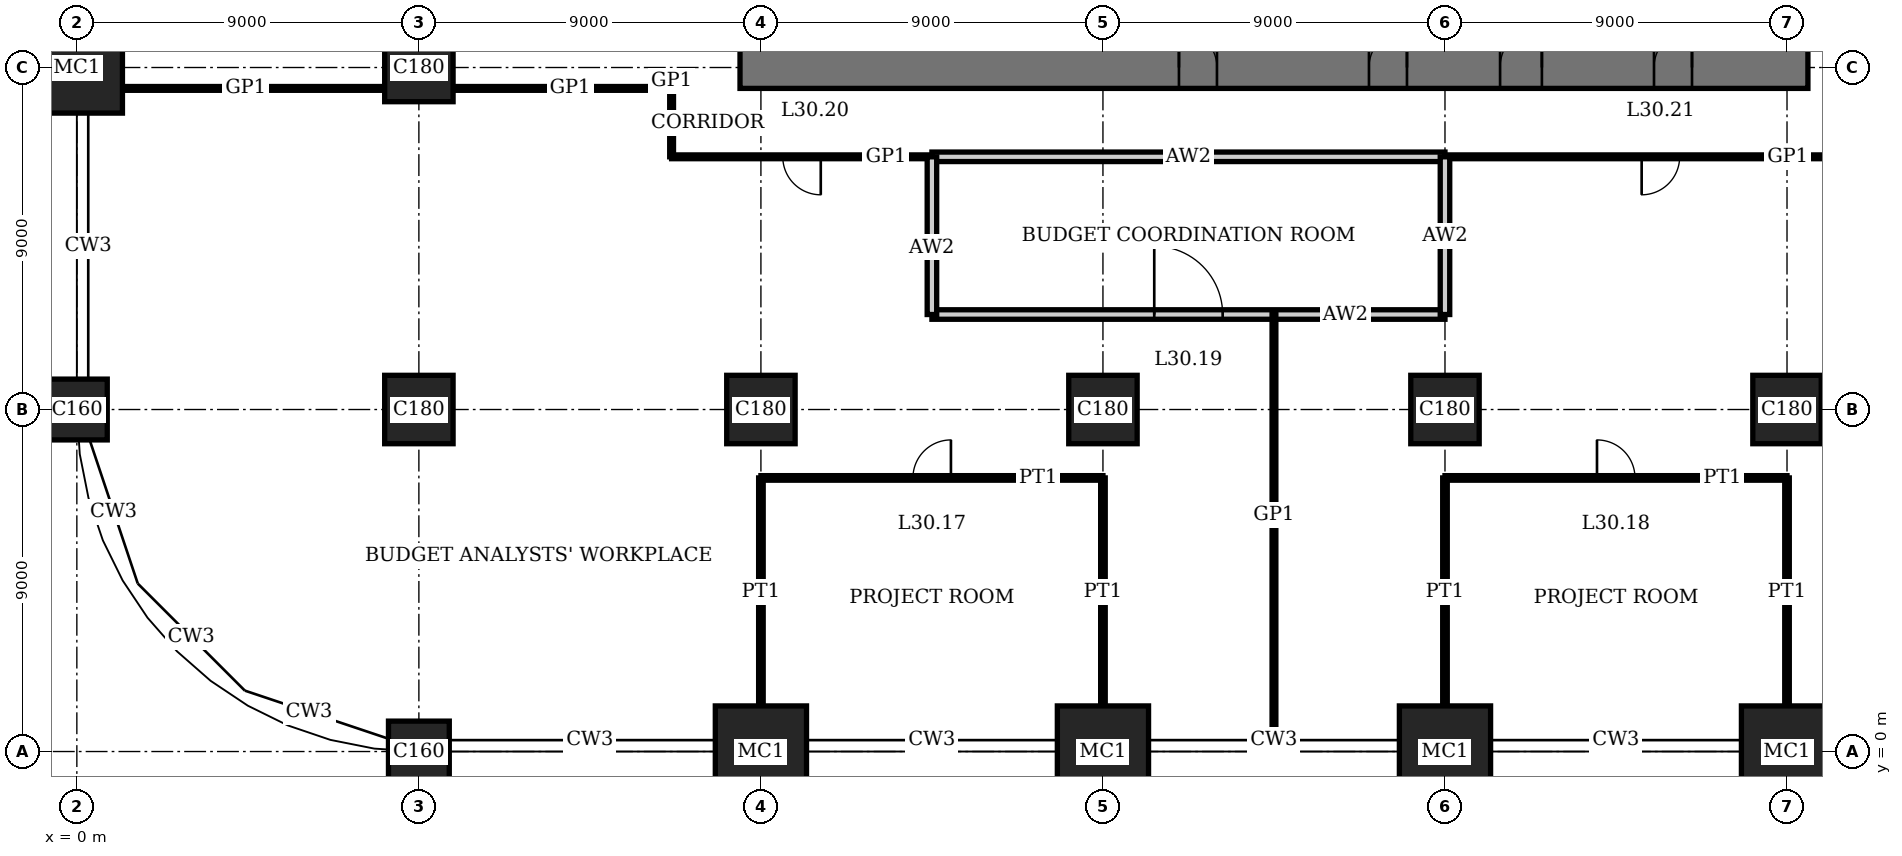
"""IFC4 building model, lengths in metres.
Left out: names, types, materials, properties, quantities, classifications, styles, units other than length and angle.
Written with IfcOpenShell. Run it as: python <this file> out.ifc"""

import sys

from ifc_helpers import new_model, si_unit, direction, frame, frame_2d, origin, origin_2d, place, context, subcontext, project, spatial, rectangle, extrude, element, fill, save


model = new_model("IFC4")
c1 = context("Model", 3, precision=1e-05, world=origin(), true_north=direction((0.0, 1.0)))
c2 = subcontext(c1, "Body", "Model", "MODEL_VIEW")
j1 = project(units=[si_unit("LENGTHUNIT", "METRE"), si_unit("PLANEANGLEUNIT", "RADIAN")], contexts=[c1])
p1 = place(None, origin())
s1 = spatial("IfcSite", under=j1, at=p1, CompositionType="ELEMENT")
p2 = place(p1, origin())
s2 = spatial("IfcBuilding", under=s1, at=p2, CompositionType="ELEMENT")
p3 = place(p2, frame((0.0, 0.0, 125.0)))
s3 = spatial("IfcBuildingStorey", under=s2, at=p3, CompositionType="ELEMENT", Elevation=125.0)
p4 = place(p3, frame((0.0, 9.0, 0.0), z_axis=(0.0, 0.0, 1.0), x_axis=(1.0, 0.0, 0.0)))
e1 = element("IfcColumn", 1, at=p4, inside=s3, PredefinedType="COLUMN", context=c2, shape_type="SweptSolid", body=[
    extrude(rectangle(XDim=1.6, YDim=1.6, at=origin_2d()), origin(), (0.0, 0.0, 1.0), 4.0),
])
p5 = place(p3, frame((0.0, 18.0, 0.0), z_axis=(0.0, 0.0, 1.0), x_axis=(1.0, 0.0, 0.0)))
e2 = element("IfcColumn", 2, at=p5, inside=s3, PredefinedType="COLUMN", context=c2, shape_type="SweptSolid", body=[
    extrude(rectangle(XDim=2.4, YDim=2.4, at=origin_2d()), origin(), (0.0, 0.0, 1.0), 4.0),
])
p6 = place(p3, frame((9.0, 0.0, 0.0), z_axis=(0.0, 0.0, 1.0), x_axis=(1.0, 0.0, 0.0)))
e3 = element("IfcColumn", 3, at=p6, inside=s3, PredefinedType="COLUMN", context=c2, shape_type="SweptSolid", body=[
    extrude(rectangle(XDim=1.6, YDim=1.6, at=origin_2d()), origin(), (0.0, 0.0, 1.0), 4.0),
])
for number, where, z_axis, x_axis in (
    (4, (9.0, 9.0, 0.0), (0.0, 0.0, 1.0), (1.0, 0.0, 0.0)),
    (5, (9.0, 18.0, 0.0), (0.0, 0.0, 1.0), (1.0, 0.0, 0.0)),
):
    element("IfcColumn", number, at=place(p3, frame(where, z_axis=z_axis, x_axis=x_axis)), inside=s3, PredefinedType="COLUMN", context=c2, shape_type="SweptSolid", body=[
        extrude(rectangle(XDim=1.8, YDim=1.8, at=origin_2d()), origin(), (0.0, 0.0, 1.0), 4.0),
    ])
p7 = place(p3, frame((18.0, 0.0, 0.0), z_axis=(0.0, 0.0, 1.0), x_axis=(1.0, 0.0, 0.0)))
e6 = element("IfcColumn", 6, at=p7, inside=s3, PredefinedType="COLUMN", context=c2, shape_type="SweptSolid", body=[
    extrude(rectangle(XDim=2.4, YDim=2.4, at=origin_2d()), origin(), (0.0, 0.0, 1.0), 4.0),
])
p8 = place(p3, frame((18.0, 9.0, 0.0), z_axis=(0.0, 0.0, 1.0), x_axis=(1.0, 0.0, 0.0)))
e7 = element("IfcColumn", 7, at=p8, inside=s3, PredefinedType="COLUMN", context=c2, shape_type="SweptSolid", body=[
    extrude(rectangle(XDim=1.8, YDim=1.8, at=origin_2d()), origin(), (0.0, 0.0, 1.0), 4.0),
])
p9 = place(p3, frame((27.0, 0.0, 0.0), z_axis=(0.0, 0.0, 1.0), x_axis=(1.0, 0.0, 0.0)))
e8 = element("IfcColumn", 8, at=p9, inside=s3, PredefinedType="COLUMN", context=c2, shape_type="SweptSolid", body=[
    extrude(rectangle(XDim=2.4, YDim=2.4, at=origin_2d()), origin(), (0.0, 0.0, 1.0), 4.0),
])
p10 = place(p3, frame((27.0, 9.0, 0.0), z_axis=(0.0, 0.0, 1.0), x_axis=(1.0, 0.0, 0.0)))
e9 = element("IfcColumn", 9, at=p10, inside=s3, PredefinedType="COLUMN", context=c2, shape_type="SweptSolid", body=[
    extrude(rectangle(XDim=1.8, YDim=1.8, at=origin_2d()), origin(), (0.0, 0.0, 1.0), 4.0),
])
p11 = place(p3, frame((36.0, 0.0, 0.0), z_axis=(0.0, 0.0, 1.0), x_axis=(1.0, 0.0, 0.0)))
e10 = element("IfcColumn", 10, at=p11, inside=s3, PredefinedType="COLUMN", context=c2, shape_type="SweptSolid", body=[
    extrude(rectangle(XDim=2.4, YDim=2.4, at=origin_2d()), origin(), (0.0, 0.0, 1.0), 4.0),
])
p12 = place(p3, frame((36.0, 9.0, 0.0), z_axis=(0.0, 0.0, 1.0), x_axis=(1.0, 0.0, 0.0)))
e11 = element("IfcColumn", 11, at=p12, inside=s3, PredefinedType="COLUMN", context=c2, shape_type="SweptSolid", body=[
    extrude(rectangle(XDim=1.8, YDim=1.8, at=origin_2d()), origin(), (0.0, 0.0, 1.0), 4.0),
])
p13 = place(p3, frame((45.0, 0.0, 0.0), z_axis=(0.0, 0.0, 1.0), x_axis=(1.0, 0.0, 0.0)))
e12 = element("IfcColumn", 12, at=p13, inside=s3, PredefinedType="COLUMN", context=c2, shape_type="SweptSolid", body=[
    extrude(rectangle(XDim=2.4, YDim=2.4, at=origin_2d()), origin(), (0.0, 0.0, 1.0), 4.0),
])
p14 = place(p3, frame((45.0, 9.0, 0.0), z_axis=(0.0, 0.0, 1.0), x_axis=(1.0, 0.0, 0.0)))
e13 = element("IfcColumn", 13, at=p14, inside=s3, PredefinedType="COLUMN", context=c2, shape_type="SweptSolid", body=[
    extrude(rectangle(XDim=1.8, YDim=1.8, at=origin_2d()), origin(), (0.0, 0.0, 1.0), 4.0),
])
p15 = place(p3, frame((17.45, 18.0, 0.0), z_axis=(0.0, 0.0, 1.0), x_axis=(1.0, 0.0, 0.0)))
e14 = element("IfcWall", 14, at=p15, inside=s3, PredefinedType="SHEAR", context=c2, shape_type="SweptSolid", body=[
    extrude(rectangle(XDim=28.1, YDim=1.1, at=frame_2d((14.05, 0.0))), origin(), (0.0, 0.0, 1.0), 4.0),
])
p16 = place(p15, frame((11.55, 0.0, 0.0)))
e15 = element("IfcOpeningElement", 15, at=p16, cuts=e14, PredefinedType="OPENING", context=c2, shape_type="SweptSolid", body=[
    extrude(rectangle(XDim=1.0, YDim=2.4, at=frame_2d((0.5, 1.2))), frame((0.0, 0.56, 0.0), z_axis=(0.0, -1.0, 0.0), x_axis=(1.0, 0.0, 0.0)), (0.0, 0.0, 1.0), 1.12),
])
p17 = place(p15, frame((16.55, 0.0, 0.0)))
e16 = element("IfcOpeningElement", 16, at=p17, cuts=e14, PredefinedType="OPENING", context=c2, shape_type="SweptSolid", body=[
    extrude(rectangle(XDim=1.0, YDim=2.4, at=frame_2d((0.5, 1.2))), frame((0.0, 0.56, 0.0), z_axis=(0.0, -1.0, 0.0), x_axis=(1.0, 0.0, 0.0)), (0.0, 0.0, 1.0), 1.12),
])
p18 = place(p15, frame((20.0, 0.0, 0.0)))
e17 = element("IfcOpeningElement", 17, at=p18, cuts=e14, PredefinedType="OPENING", context=c2, shape_type="SweptSolid", body=[
    extrude(rectangle(XDim=1.1, YDim=2.4, at=frame_2d((0.55, 1.2))), frame((0.0, 0.56, 0.0), z_axis=(0.0, -1.0, 0.0), x_axis=(1.0, 0.0, 0.0)), (0.0, 0.0, 1.0), 1.12),
])
p19 = place(p15, frame((24.05, 0.0, 0.0)))
e18 = element("IfcOpeningElement", 18, at=p19, cuts=e14, PredefinedType="OPENING", context=c2, shape_type="SweptSolid", body=[
    extrude(rectangle(XDim=1.0, YDim=2.4, at=frame_2d((0.5, 1.2))), frame((0.0, 0.56, 0.0), z_axis=(0.0, -1.0, 0.0), x_axis=(1.0, 0.0, 0.0)), (0.0, 0.0, 1.0), 1.12),
])
p20 = place(p3, frame((18.0, 7.2, 0.0), z_axis=(0.0, 0.0, 1.0), x_axis=(1.0, 0.0, 0.0)))
e19 = element("IfcWall", 19, at=p20, inside=s3, PredefinedType="PARTITIONING", context=c2, shape_type="SweptSolid", body=[
    extrude(rectangle(XDim=9.0, YDim=0.12, at=frame_2d((4.5, 0.0))), origin(), (0.0, 0.0, 1.0), 3.75),
])
p21 = place(p20, frame((4.0, 0.0, 0.0)))
e20 = element("IfcOpeningElement", 20, at=p21, cuts=e19, PredefinedType="OPENING", context=c2, shape_type="SweptSolid", body=[
    extrude(rectangle(XDim=1.0, YDim=2.4, at=frame_2d((0.5, 1.2))), frame((0.0, 0.07, 0.0), z_axis=(0.0, -1.0, 0.0), x_axis=(1.0, 0.0, 0.0)), (0.0, 0.0, 1.0), 0.14),
])
p22 = place(p3, frame((36.0, 7.2, 0.0), z_axis=(0.0, 0.0, 1.0), x_axis=(1.0, 0.0, 0.0)))
e21 = element("IfcWall", 21, at=p22, inside=s3, PredefinedType="PARTITIONING", context=c2, shape_type="SweptSolid", body=[
    extrude(rectangle(XDim=9.0, YDim=0.12, at=frame_2d((4.5, 0.0))), origin(), (0.0, 0.0, 1.0), 3.75),
])
p23 = place(p22, frame((4.0, 0.0, 0.0)))
e22 = element("IfcOpeningElement", 22, at=p23, cuts=e21, PredefinedType="OPENING", context=c2, shape_type="SweptSolid", body=[
    extrude(rectangle(XDim=1.0, YDim=2.4, at=frame_2d((0.5, 1.2))), frame((0.0, 0.07, 0.0), z_axis=(0.0, -1.0, 0.0), x_axis=(1.0, 0.0, 0.0)), (0.0, 0.0, 1.0), 0.14),
])
p24 = place(p3, frame((22.5, 11.5, 0.0), z_axis=(0.0, 0.0, 1.0), x_axis=(1.0, 0.0, 0.0)))
e23 = element("IfcWall", 23, at=p24, inside=s3, PredefinedType="PARTITIONING", context=c2, shape_type="SweptSolid", body=[
    extrude(rectangle(XDim=13.5, YDim=0.25, at=frame_2d((6.75, 0.0))), origin(), (0.0, 0.0, 1.0), 3.75),
])
p25 = place(p24, frame((5.85, 0.0, 0.0)))
e24 = element("IfcOpeningElement", 24, at=p25, cuts=e23, PredefinedType="OPENING", context=c2, shape_type="SweptSolid", body=[
    extrude(rectangle(XDim=1.8, YDim=2.4, at=frame_2d((0.9, 1.2))), frame((0.0, 0.135, 0.0), z_axis=(0.0, -1.0, 0.0), x_axis=(1.0, 0.0, 0.0)), (0.0, 0.0, 1.0), 0.27),
])
p26 = place(p3, frame((22.5, 15.65, 0.0), z_axis=(0.0, 0.0, 1.0), x_axis=(1.0, 0.0, 0.0)))
e25 = element("IfcWall", 25, at=p26, inside=s3, PredefinedType="PARTITIONING", context=c2, shape_type="SweptSolid", body=[
    extrude(rectangle(XDim=13.5, YDim=0.25, at=frame_2d((6.75, 0.0))), origin(), (0.0, 0.0, 1.0), 3.75),
])
p27 = place(p3, frame((15.65, 15.65, 0.0), z_axis=(0.0, 0.0, 1.0), x_axis=(1.0, 0.0, 0.0)))
e26 = element("IfcWall", 26, at=p27, inside=s3, PredefinedType="PARTITIONING", context=c2, shape_type="SweptSolid", body=[
    extrude(rectangle(XDim=6.85, YDim=0.1, at=frame_2d((3.425, 0.0))), origin(), (0.0, 0.0, 1.0), 3.75),
])
p28 = place(p27, frame((2.925, 0.0, 0.0)))
e27 = element("IfcOpeningElement", 27, at=p28, cuts=e26, PredefinedType="OPENING", context=c2, shape_type="SweptSolid", body=[
    extrude(rectangle(XDim=1.0, YDim=2.4, at=frame_2d((0.5, 1.2))), frame((0.0, 0.06, 0.0), z_axis=(0.0, -1.0, 0.0), x_axis=(1.0, 0.0, 0.0)), (0.0, 0.0, 1.0), 0.12),
])
p29 = place(p3, frame((36.0, 15.65, 0.0), z_axis=(0.0, 0.0, 1.0), x_axis=(1.0, 0.0, 0.0)))
e28 = element("IfcWall", 28, at=p29, inside=s3, PredefinedType="PARTITIONING", context=c2, shape_type="SweptSolid", body=[
    extrude(rectangle(XDim=11.35, YDim=0.1, at=frame_2d((5.675, 0.0))), origin(), (0.0, 0.0, 1.0), 3.75),
])
p30 = place(p29, frame((5.175, 0.0, 0.0)))
e29 = element("IfcOpeningElement", 29, at=p30, cuts=e28, PredefinedType="OPENING", context=c2, shape_type="SweptSolid", body=[
    extrude(rectangle(XDim=1.0, YDim=2.4, at=frame_2d((0.5, 1.2))), frame((0.0, 0.06, 0.0), z_axis=(0.0, -1.0, 0.0), x_axis=(1.0, 0.0, 0.0)), (0.0, 0.0, 1.0), 0.12),
])
p31 = place(p3, frame((1.2, 17.45, 0.0), z_axis=(0.0, 0.0, 1.0), x_axis=(1.0, 0.0, 0.0)))
e30 = element("IfcWall", 30, at=p31, inside=s3, PredefinedType="PARTITIONING", context=c2, shape_type="SweptSolid", body=[
    extrude(rectangle(XDim=6.9, YDim=0.1, at=frame_2d((3.45, 0.0))), origin(), (0.0, 0.0, 1.0), 3.75),
])
p32 = place(p3, frame((9.9, 17.45, 0.0), z_axis=(0.0, 0.0, 1.0), x_axis=(1.0, 0.0, 0.0)))
e31 = element("IfcWall", 31, at=p32, inside=s3, PredefinedType="PARTITIONING", context=c2, shape_type="SweptSolid", body=[
    extrude(rectangle(XDim=5.75, YDim=0.1, at=frame_2d((2.875, 0.0))), origin(), (0.0, 0.0, 1.0), 3.75),
])
p33 = place(p3, frame((15.65, 15.65, 0.0), z_axis=(0.0, 0.0, 1.0), x_axis=(0.0, 1.0, 0.0)))
e32 = element("IfcWall", 32, at=p33, inside=s3, PredefinedType="PARTITIONING", context=c2, shape_type="SweptSolid", body=[
    extrude(rectangle(XDim=1.8, YDim=0.1, at=frame_2d((0.9, 0.0))), origin(), (0.0, 0.0, 1.0), 3.75),
])
p34 = place(p3, frame((18.0, 1.2, 0.0), z_axis=(0.0, 0.0, 1.0), x_axis=(0.0, 1.0, 0.0)))
e33 = element("IfcWall", 33, at=p34, inside=s3, PredefinedType="PARTITIONING", context=c2, shape_type="SweptSolid", body=[
    extrude(rectangle(XDim=6.0, YDim=0.12, at=frame_2d((3.0, 0.0))), origin(), (0.0, 0.0, 1.0), 3.05),
])
p35 = place(p3, frame((22.5, 11.5, 0.0), z_axis=(0.0, 0.0, 1.0), x_axis=(0.0, 1.0, 0.0)))
e34 = element("IfcWall", 34, at=p35, inside=s3, PredefinedType="PARTITIONING", context=c2, shape_type="SweptSolid", body=[
    extrude(rectangle(XDim=4.15, YDim=0.25, at=frame_2d((2.075, 0.0))), origin(), (0.0, 0.0, 1.0), 3.75),
])
p36 = place(p3, frame((27.0, 1.2, 0.0), z_axis=(0.0, 0.0, 1.0), x_axis=(0.0, 1.0, 0.0)))
e35 = element("IfcWall", 35, at=p36, inside=s3, PredefinedType="PARTITIONING", context=c2, shape_type="SweptSolid", body=[
    extrude(rectangle(XDim=6.0, YDim=0.12, at=frame_2d((3.0, 0.0))), origin(), (0.0, 0.0, 1.0), 3.05),
])
p37 = place(p3, frame((31.5, 0.31, 0.0), z_axis=(0.0, 0.0, 1.0), x_axis=(0.0, 1.0, 0.0)))
e36 = element("IfcWall", 36, at=p37, inside=s3, PredefinedType="PARTITIONING", context=c2, shape_type="SweptSolid", body=[
    extrude(rectangle(XDim=11.2, YDim=0.1, at=frame_2d((5.6, 0.0))), origin(), (0.0, 0.0, 1.0), 3.75),
])
p38 = place(p3, frame((36.0, 11.5, 0.0), z_axis=(0.0, 0.0, 1.0), x_axis=(0.0, 1.0, 0.0)))
e37 = element("IfcWall", 37, at=p38, inside=s3, PredefinedType="PARTITIONING", context=c2, shape_type="SweptSolid", body=[
    extrude(rectangle(XDim=4.15, YDim=0.25, at=frame_2d((2.075, 0.0))), origin(), (0.0, 0.0, 1.0), 3.05),
])
for number, where, z_axis, x_axis in (
    (38, (36.0, 1.2, 0.0), (0.0, 0.0, 1.0), (0.0, 1.0, 0.0)),
    (39, (45.0, 1.2, 0.0), (0.0, 0.0, 1.0), (0.0, 1.0, 0.0)),
):
    element("IfcWall", number, at=place(p3, frame(where, z_axis=z_axis, x_axis=x_axis)), inside=s3, PredefinedType="PARTITIONING", context=c2, shape_type="SweptSolid", body=[
        extrude(rectangle(XDim=6.0, YDim=0.12, at=frame_2d((3.0, 0.0))), origin(), (0.0, 0.0, 1.0), 3.05),
    ])
p39 = place(p16, origin())
e40 = element("IfcDoor", 40, at=p39, inside=s3, OperationType="SINGLE_SWING_RIGHT", PredefinedType="DOOR", context=c2, shape_type="SweptSolid", body=[
    extrude(rectangle(XDim=1.0, YDim=2.4, at=frame_2d((0.5, 1.2))), frame((0.0, 0.025, 0.0), z_axis=(0.0, -1.0, 0.0), x_axis=(1.0, 0.0, 0.0)), (0.0, 0.0, 1.0), 0.05),
    extrude(rectangle(XDim=0.04, YDim=2.4, at=frame_2d((0.02, 1.2))), frame((0.0, 0.4, 0.0), z_axis=(0.0, -1.0, 0.0), x_axis=(1.0, 0.0, 0.0)), (0.0, 0.0, 1.0), 0.8),
    extrude(rectangle(XDim=0.04, YDim=2.4, at=frame_2d((0.98, 1.2))), frame((0.0, 0.4, 0.0), z_axis=(0.0, -1.0, 0.0), x_axis=(1.0, 0.0, 0.0)), (0.0, 0.0, 1.0), 0.8),
    extrude(rectangle(XDim=1.0, YDim=0.04, at=frame_2d((0.5, 2.38))), frame((0.0, 0.4, 0.0), z_axis=(0.0, -1.0, 0.0), x_axis=(1.0, 0.0, 0.0)), (0.0, 0.0, 1.0), 0.8),
])
fill(e15, e40)
p40 = place(p17, origin())
e41 = element("IfcDoor", 41, at=p40, inside=s3, OperationType="SINGLE_SWING_LEFT", PredefinedType="DOOR", context=c2, shape_type="SweptSolid", body=[
    extrude(rectangle(XDim=1.0, YDim=2.4, at=frame_2d((0.5, 1.2))), frame((0.0, 0.025, 0.0), z_axis=(0.0, -1.0, 0.0), x_axis=(1.0, 0.0, 0.0)), (0.0, 0.0, 1.0), 0.05),
    extrude(rectangle(XDim=0.04, YDim=2.4, at=frame_2d((0.02, 1.2))), frame((0.0, 0.4, 0.0), z_axis=(0.0, -1.0, 0.0), x_axis=(1.0, 0.0, 0.0)), (0.0, 0.0, 1.0), 0.8),
    extrude(rectangle(XDim=0.04, YDim=2.4, at=frame_2d((0.98, 1.2))), frame((0.0, 0.4, 0.0), z_axis=(0.0, -1.0, 0.0), x_axis=(1.0, 0.0, 0.0)), (0.0, 0.0, 1.0), 0.8),
    extrude(rectangle(XDim=1.0, YDim=0.04, at=frame_2d((0.5, 2.38))), frame((0.0, 0.4, 0.0), z_axis=(0.0, -1.0, 0.0), x_axis=(1.0, 0.0, 0.0)), (0.0, 0.0, 1.0), 0.8),
])
fill(e16, e41)
p41 = place(p18, origin())
e42 = element("IfcDoor", 42, at=p41, inside=s3, OperationType="SINGLE_SWING_LEFT", PredefinedType="DOOR", context=c2, shape_type="SweptSolid", body=[
    extrude(rectangle(XDim=1.1, YDim=2.4, at=frame_2d((0.55, 1.2))), frame((0.0, 0.025, 0.0), z_axis=(0.0, -1.0, 0.0), x_axis=(1.0, 0.0, 0.0)), (0.0, 0.0, 1.0), 0.05),
    extrude(rectangle(XDim=0.04, YDim=2.4, at=frame_2d((0.02, 1.2))), frame((0.0, 0.44, 0.0), z_axis=(0.0, -1.0, 0.0), x_axis=(1.0, 0.0, 0.0)), (0.0, 0.0, 1.0), 0.88),
    extrude(rectangle(XDim=0.04, YDim=2.4, at=frame_2d((1.08, 1.2))), frame((0.0, 0.44, 0.0), z_axis=(0.0, -1.0, 0.0), x_axis=(1.0, 0.0, 0.0)), (0.0, 0.0, 1.0), 0.88),
    extrude(rectangle(XDim=1.1, YDim=0.04, at=frame_2d((0.55, 2.38))), frame((0.0, 0.44, 0.0), z_axis=(0.0, -1.0, 0.0), x_axis=(1.0, 0.0, 0.0)), (0.0, 0.0, 1.0), 0.88),
])
fill(e17, e42)
p42 = place(p19, origin())
e43 = element("IfcDoor", 43, at=p42, inside=s3, OperationType="SINGLE_SWING_LEFT", PredefinedType="DOOR", context=c2, shape_type="SweptSolid", body=[
    extrude(rectangle(XDim=1.0, YDim=2.4, at=frame_2d((0.5, 1.2))), frame((0.0, 0.025, 0.0), z_axis=(0.0, -1.0, 0.0), x_axis=(1.0, 0.0, 0.0)), (0.0, 0.0, 1.0), 0.05),
    extrude(rectangle(XDim=0.04, YDim=2.4, at=frame_2d((0.02, 1.2))), frame((0.0, 0.4, 0.0), z_axis=(0.0, -1.0, 0.0), x_axis=(1.0, 0.0, 0.0)), (0.0, 0.0, 1.0), 0.8),
    extrude(rectangle(XDim=0.04, YDim=2.4, at=frame_2d((0.98, 1.2))), frame((0.0, 0.4, 0.0), z_axis=(0.0, -1.0, 0.0), x_axis=(1.0, 0.0, 0.0)), (0.0, 0.0, 1.0), 0.8),
    extrude(rectangle(XDim=1.0, YDim=0.04, at=frame_2d((0.5, 2.38))), frame((0.0, 0.4, 0.0), z_axis=(0.0, -1.0, 0.0), x_axis=(1.0, 0.0, 0.0)), (0.0, 0.0, 1.0), 0.8),
])
fill(e18, e43)
p43 = place(p21, origin())
e44 = element("IfcDoor", 44, at=p43, inside=s3, OperationType="SINGLE_SWING_LEFT", PredefinedType="DOOR", context=c2, shape_type="SweptSolid", body=[
    extrude(rectangle(XDim=1.0, YDim=2.4, at=frame_2d((0.5, 1.2))), frame((0.0, 0.025, 0.0), z_axis=(0.0, -1.0, 0.0), x_axis=(1.0, 0.0, 0.0)), (0.0, 0.0, 1.0), 0.05),
])
fill(e20, e44)
p44 = place(p23, origin())
e45 = element("IfcDoor", 45, at=p44, inside=s3, OperationType="SINGLE_SWING_RIGHT", PredefinedType="DOOR", context=c2, shape_type="SweptSolid", body=[
    extrude(rectangle(XDim=1.0, YDim=2.4, at=frame_2d((0.5, 1.2))), frame((0.0, 0.025, 0.0), z_axis=(0.0, -1.0, 0.0), x_axis=(1.0, 0.0, 0.0)), (0.0, 0.0, 1.0), 0.05),
])
fill(e22, e45)
p45 = place(p25, origin())
e46 = element("IfcDoor", 46, at=p45, inside=s3, OperationType="DOUBLE_DOOR_SINGLE_SWING", PredefinedType="DOOR", context=c2, shape_type="SweptSolid", body=[
    extrude(rectangle(XDim=1.8, YDim=2.4, at=frame_2d((0.9, 1.2))), frame((0.0, 0.025, 0.0), z_axis=(0.0, -1.0, 0.0), x_axis=(1.0, 0.0, 0.0)), (0.0, 0.0, 1.0), 0.05),
])
fill(e24, e46)
p46 = place(p28, origin())
e47 = element("IfcDoor", 47, at=p46, inside=s3, OperationType="SINGLE_SWING_RIGHT", PredefinedType="DOOR", context=c2, shape_type="SweptSolid", body=[
    extrude(rectangle(XDim=1.0, YDim=2.4, at=frame_2d((0.5, 1.2))), frame((0.0, 0.02, 0.0), z_axis=(0.0, -1.0, 0.0), x_axis=(1.0, 0.0, 0.0)), (0.0, 0.0, 1.0), 0.04),
])
fill(e27, e47)
p47 = place(p30, origin())
e48 = element("IfcDoor", 48, at=p47, inside=s3, OperationType="SINGLE_SWING_LEFT", PredefinedType="DOOR", context=c2, shape_type="SweptSolid", body=[
    extrude(rectangle(XDim=1.0, YDim=2.4, at=frame_2d((0.5, 1.2))), frame((0.0, 0.02, 0.0), z_axis=(0.0, -1.0, 0.0), x_axis=(1.0, 0.0, 0.0)), (0.0, 0.0, 1.0), 0.04),
])
fill(e29, e48)
save(model, sys.argv[1])
